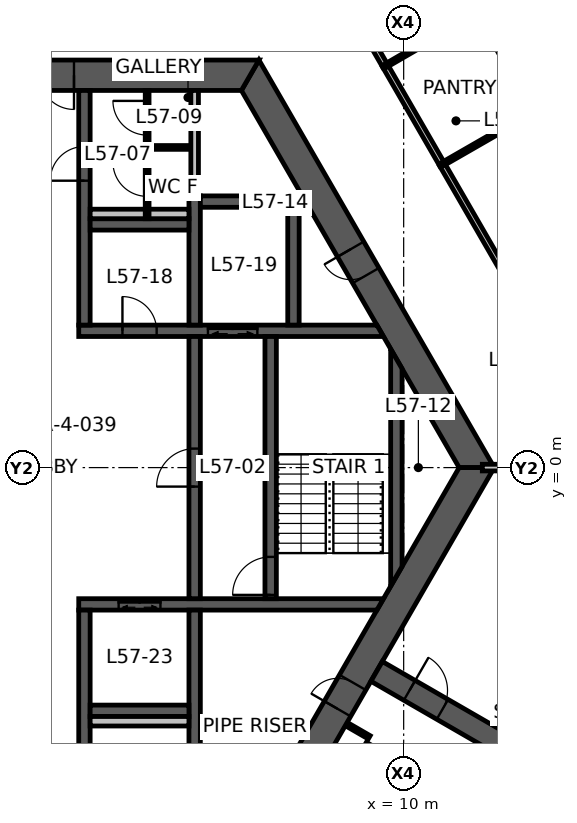
"""IFC4 building model, lengths in metres.
Left out: names, types, materials, properties, quantities, classifications, styles, units other than length and angle.
Written with IfcOpenShell. Run it as: python <this file> out.ifc"""

import sys

from ifc_helpers import new_model, si_unit, direction, frame, frame_2d, origin, place, context, subcontext, project, spatial, polyline, rectangle, outline, extrude, element, fill, save


model = new_model("IFC4")
c1 = context("Model", 3, precision=1e-05, world=origin(), true_north=direction((0.0, 1.0)))
c2 = subcontext(c1, "Body", "Model", "MODEL_VIEW")
j1 = project(units=[si_unit("LENGTHUNIT", "METRE"), si_unit("PLANEANGLEUNIT", "RADIAN")], contexts=[c1])
p1 = place(None, origin())
s1 = spatial("IfcSite", under=j1, at=p1, CompositionType="ELEMENT")
p2 = place(p1, origin())
s2 = spatial("IfcBuilding", under=s1, at=p2, CompositionType="ELEMENT")
p3 = place(p2, frame((0.0, 0.0, 228.4)))
s3 = spatial("IfcBuildingStorey", under=s2, at=p3, CompositionType="ELEMENT", Elevation=228.4)
p4 = place(p3, frame((11.922, 0.0, 0.0), z_axis=(0.0, 0.0, 1.0), x_axis=(-0.500004296715, 0.866022923061, 0.0)))
e1 = element("IfcWall", 1, at=p4, inside=s3, PredefinedType="SHEAR", context=c2, shape_type="SweptSolid", body=[
    extrude(outline(polyline([(-0.231, -0.4), (5.835, -0.4), (6.635, -0.4), (12.153, -0.4), (11.691, 0.4), (6.635, 0.4), (5.835, 0.4), (0.231, 0.4), (-0.231, -0.4)])), origin(), (0.0, 0.0, 1.0), 3.9),
])
p5 = place(p4, frame((5.835, 0.0, 0.0)))
e2 = element("IfcOpeningElement", 2, at=p5, cuts=e1, PredefinedType="OPENING", context=c2, shape_type="SweptSolid", body=[
    extrude(rectangle(XDim=0.8, YDim=2.1, at=frame_2d((0.4, 1.05))), frame((0.0, 0.41, 0.0), z_axis=(0.0, -1.0, 0.0), x_axis=(1.0, 0.0, 0.0)), (0.0, 0.0, 1.0), 0.82),
])
p6 = place(p3, frame((5.961, 10.325, 0.0), z_axis=(0.0, 0.0, 1.0), x_axis=(-1.0, 0.0, 0.0)))
e3 = element("IfcWall", 3, at=p6, inside=s3, PredefinedType="SHEAR", context=c2, shape_type="SweptSolid", body=[
    extrude(outline(polyline([(-0.231, -0.4), (4.636, -0.4), (5.536, -0.4), (6.386, -0.4), (7.286, -0.4), (12.153, -0.4), (11.691, 0.4), (7.286, 0.4), (6.386, 0.4), (5.536, 0.4), (4.636, 0.4), (0.231, 0.4), (-0.231, -0.4)])), origin(), (0.0, 0.0, 1.0), 3.9),
])
p7 = place(p6, frame((6.386, 0.0, 0.0)))
e4 = element("IfcOpeningElement", 4, at=p7, cuts=e3, PredefinedType="OPENING", context=c2, shape_type="SweptSolid", body=[
    extrude(rectangle(XDim=0.9, YDim=2.1, at=frame_2d((0.45, 1.05))), frame((0.0, 0.41, 0.0), z_axis=(0.0, -1.0, 0.0), x_axis=(1.0, 0.0, 0.0)), (0.0, 0.0, 1.0), 0.82),
])
p8 = place(p6, frame((4.636, 0.0, 0.0)))
e5 = element("IfcOpeningElement", 5, at=p8, cuts=e3, PredefinedType="OPENING", context=c2, shape_type="SweptSolid", body=[
    extrude(rectangle(XDim=0.9, YDim=2.1, at=frame_2d((0.45, 1.05))), frame((0.0, 0.41, 0.0), z_axis=(0.0, -1.0, 0.0), x_axis=(1.0, 0.0, 0.0)), (0.0, 0.0, 1.0), 0.82),
])
p9 = place(p3, frame((5.961, -10.325, 0.0), z_axis=(0.0, 0.0, 1.0), x_axis=(0.500004296715, 0.866022923061, 0.0)))
e6 = element("IfcWall", 6, at=p9, inside=s3, PredefinedType="SHEAR", context=c2, shape_type="SweptSolid", body=[
    extrude(outline(polyline([(-0.231, -0.4), (4.594, -0.4), (5.394, -0.4), (12.153, -0.4), (11.691, 0.4), (5.394, 0.4), (4.594, 0.4), (0.231, 0.4), (-0.231, -0.4)])), origin(), (0.0, 0.0, 1.0), 3.9),
])
p10 = place(p9, frame((4.594, 0.0, 0.0)))
e7 = element("IfcOpeningElement", 7, at=p10, cuts=e6, PredefinedType="OPENING", context=c2, shape_type="SweptSolid", body=[
    extrude(rectangle(XDim=0.8, YDim=2.1, at=frame_2d((0.4, 1.05))), frame((0.0, 0.41, 0.0), z_axis=(0.0, -1.0, 0.0), x_axis=(1.0, 0.0, 0.0)), (0.0, 0.0, 1.0), 0.82),
])
p11 = place(p3, frame((9.288, -5.363, 0.0), z_axis=(0.0, 0.0, 1.0), x_axis=(0.866031736626, -0.499989031036, 0.0)))
e8 = element("IfcWall", 8, at=p11, inside=s3, PredefinedType="SHEAR", context=c2, shape_type="SweptSolid", body=[
    extrude(rectangle(XDim=7.796, YDim=0.6, at=frame_2d((3.898, 0.0))), origin(), (0.0, 0.0, 1.0), 3.9),
])
p12 = place(p11, frame((1.0, 0.0, 0.0)))
e9 = element("IfcOpeningElement", 9, at=p12, cuts=e8, PredefinedType="OPENING", context=c2, shape_type="SweptSolid", body=[
    extrude(rectangle(XDim=1.0, YDim=2.1, at=frame_2d((0.5, 1.05))), frame((0.0, 0.31, 0.0), z_axis=(0.0, -1.0, 0.0), x_axis=(1.0, 0.0, 0.0)), (0.0, 0.0, 1.0), 0.62),
])
p13 = place(p3, frame((1.45, 3.6, 0.0), z_axis=(0.0, 0.0, 1.0), x_axis=(1.0, 0.0, 0.0)))
e10 = element("IfcWall", 10, at=p13, inside=s3, PredefinedType="SHEAR", context=c2, shape_type="SweptSolid", body=[
    extrude(outline(polyline([(0.0, -0.15), (1.15, -0.15), (2.05, -0.15), (3.4, -0.15), (4.7, -0.15), (8.019, -0.15), (7.845, 0.15), (4.7, 0.15), (3.4, 0.15), (2.05, 0.15), (1.15, 0.15), (0.0, 0.15), (0.0, -0.15)])), origin(), (0.0, 0.0, 1.0), 3.9),
])
p14 = place(p13, frame((1.15, 0.0, 0.0)))
e11 = element("IfcOpeningElement", 11, at=p14, cuts=e10, PredefinedType="OPENING", context=c2, shape_type="SweptSolid", body=[
    extrude(rectangle(XDim=0.9, YDim=2.1, at=frame_2d((0.45, 1.05))), frame((0.0, 0.16, 0.0), z_axis=(0.0, -1.0, 0.0), x_axis=(1.0, 0.0, 0.0)), (0.0, 0.0, 1.0), 0.32),
])
p15 = place(p13, frame((3.4, 0.0, 0.0)))
e12 = element("IfcOpeningElement", 12, at=p15, cuts=e10, PredefinedType="OPENING", context=c2, shape_type="SweptSolid", body=[
    extrude(rectangle(XDim=1.3, YDim=2.1, at=frame_2d((0.65, 1.05))), frame((0.0, 0.16, 0.0), z_axis=(0.0, -1.0, 0.0), x_axis=(1.0, 0.0, 0.0)), (0.0, 0.0, 1.0), 0.32),
])
p16 = place(p3, frame((1.45, -3.6, 0.0), z_axis=(0.0, 0.0, 1.0), x_axis=(1.0, 0.0, 0.0)))
e13 = element("IfcWall", 13, at=p16, inside=s3, PredefinedType="SHEAR", context=c2, shape_type="SweptSolid", body=[
    extrude(outline(polyline([(0.0, -0.15), (1.05, -0.15), (2.15, -0.15), (7.845, -0.15), (8.019, 0.15), (2.15, 0.15), (1.05, 0.15), (0.0, 0.15), (0.0, -0.15)])), origin(), (0.0, 0.0, 1.0), 3.9),
])
p17 = place(p16, frame((1.05, 0.0, 0.0)))
e14 = element("IfcOpeningElement", 14, at=p17, cuts=e13, PredefinedType="OPENING", context=c2, shape_type="SweptSolid", body=[
    extrude(rectangle(XDim=1.1, YDim=2.1, at=frame_2d((0.55, 1.05))), frame((0.0, 0.16, 0.0), z_axis=(0.0, -1.0, 0.0), x_axis=(1.0, 0.0, 0.0)), (0.0, 0.0, 1.0), 0.32),
])
p18 = place(p3, frame((1.6, 3.75, 0.0), z_axis=(0.0, 0.0, 1.0), x_axis=(0.0, 1.0, 0.0)))
e15 = element("IfcWall", 15, at=p18, inside=s3, PredefinedType="SHEAR", context=c2, shape_type="SweptSolid", body=[
    extrude(rectangle(XDim=6.175, YDim=0.3, at=frame_2d((3.087, 0.0))), origin(), (0.0, 0.0, 1.0), 3.9),
])
p19 = place(p18, frame((3.8, 0.0, 0.0)))
e16 = element("IfcOpeningElement", 16, at=p19, cuts=e15, PredefinedType="OPENING", context=c2, shape_type="SweptSolid", body=[
    extrude(rectangle(XDim=0.9, YDim=2.1, at=frame_2d((0.45, 1.05))), frame((0.0, 0.16, 0.0), z_axis=(0.0, -1.0, 0.0), x_axis=(1.0, 0.0, 0.0)), (0.0, 0.0, 1.0), 0.32),
])
p20 = place(p3, frame((1.6, -3.75, 0.0), z_axis=(0.0, 0.0, 1.0), x_axis=(0.0, -1.0, 0.0)))
e17 = element("IfcWall", 17, at=p20, inside=s3, PredefinedType="SHEAR", context=c2, shape_type="SweptSolid", body=[
    extrude(rectangle(XDim=6.175, YDim=0.3, at=frame_2d((3.087, 0.0))), origin(), (0.0, 0.0, 1.0), 3.9),
])
p21 = place(p20, frame((3.65, 0.0, 0.0)))
e18 = element("IfcOpeningElement", 18, at=p21, cuts=e17, PredefinedType="OPENING", context=c2, shape_type="SweptSolid", body=[
    extrude(rectangle(XDim=1.2, YDim=2.1, at=frame_2d((0.6, 1.05))), frame((0.0, 0.16, 0.0), z_axis=(0.0, -1.0, 0.0), x_axis=(1.0, 0.0, 0.0)), (0.0, 0.0, 1.0), 0.32),
])
p22 = place(p3, frame((4.5, -3.45, 0.0), z_axis=(0.0, 0.0, 1.0), x_axis=(0.0, 1.0, 0.0)))
e19 = element("IfcWall", 19, at=p22, inside=s3, PredefinedType="SHEAR", context=c2, shape_type="SweptSolid", body=[
    extrude(rectangle(XDim=6.9, YDim=0.3, at=frame_2d((3.45, 0.0))), origin(), (0.0, 0.0, 1.0), 3.9),
])
p23 = place(p22, frame((2.95, 0.0, 0.0)))
e20 = element("IfcOpeningElement", 20, at=p23, cuts=e19, PredefinedType="OPENING", context=c2, shape_type="SweptSolid", body=[
    extrude(rectangle(XDim=1.0, YDim=2.1, at=frame_2d((0.5, 1.05))), frame((0.0, 0.16, 0.0), z_axis=(0.0, -1.0, 0.0), x_axis=(1.0, 0.0, 0.0)), (0.0, 0.0, 1.0), 0.32),
])
p24 = place(p3, frame((6.5, -3.45, 0.0), z_axis=(0.0, 0.0, 1.0), x_axis=(0.0, 1.0, 0.0)))
e21 = element("IfcWall", 21, at=p24, inside=s3, PredefinedType="SHEAR", context=c2, shape_type="SweptSolid", body=[
    extrude(rectangle(XDim=6.9, YDim=0.3, at=frame_2d((3.45, 0.0))), origin(), (0.0, 0.0, 1.0), 3.9),
])
p25 = place(p24, frame((0.1, 0.0, 0.0)))
e22 = element("IfcOpeningElement", 22, at=p25, cuts=e21, PredefinedType="OPENING", context=c2, shape_type="SweptSolid", body=[
    extrude(rectangle(XDim=1.0, YDim=2.1, at=frame_2d((0.5, 1.05))), frame((0.0, 0.16, 0.0), z_axis=(0.0, -1.0, 0.0), x_axis=(1.0, 0.0, 0.0)), (0.0, 0.0, 1.0), 0.32),
])
p26 = place(p3, frame((4.5, 3.75, 0.0), z_axis=(0.0, 0.0, 1.0), x_axis=(0.0, 1.0, 0.0)))
e23 = element("IfcWall", 23, at=p26, inside=s3, PredefinedType="SHEAR", context=c2, shape_type="SweptSolid", body=[
    extrude(rectangle(XDim=3.4, YDim=0.3, at=frame_2d((1.7, 0.0))), origin(), (0.0, 0.0, 1.0), 3.9),
])
p27 = place(p3, frame((4.5, -3.75, 0.0), z_axis=(0.0, 0.0, 1.0), x_axis=(0.0, -1.0, 0.0)))
e24 = element("IfcWall", 24, at=p27, inside=s3, PredefinedType="SHEAR", context=c2, shape_type="SweptSolid", body=[
    extrude(rectangle(XDim=6.175, YDim=0.3, at=frame_2d((3.087, 0.0))), origin(), (0.0, 0.0, 1.0), 3.9),
])
for number, where, z_axis, x_axis in (
    (25, (1.75, 6.4, 0.0), (0.0, 0.0, 1.0), (1.0, 0.0, 0.0)),
    (26, (1.75, -6.4, 0.0), (0.0, 0.0, 1.0), (1.0, 0.0, 0.0)),
    (27, (4.65, 7.0, 0.0), (0.0, 0.0, 1.0), (1.0, 0.0, 0.0)),
):
    element("IfcWall", number, at=place(p3, frame(where, z_axis=z_axis, x_axis=x_axis)), inside=s3, PredefinedType="SHEAR", context=c2, shape_type="SweptSolid", body=[
        extrude(rectangle(XDim=2.6, YDim=0.3, at=frame_2d((1.3, 0.0))), origin(), (0.0, 0.0, 1.0), 3.9),
    ])
p28 = place(p3, frame((7.1, 3.75, 0.0), z_axis=(0.0, 0.0, 1.0), x_axis=(0.0, 1.0, 0.0)))
e28 = element("IfcWall", 28, at=p28, inside=s3, PredefinedType="SHEAR", context=c2, shape_type="SweptSolid", body=[
    extrude(rectangle(XDim=3.1, YDim=0.3, at=frame_2d((1.55, 0.0))), origin(), (0.0, 0.0, 1.0), 3.9),
])
p29 = place(p3, frame((9.808, -2.862, 0.0), z_axis=(0.0, 0.0, 1.0), x_axis=(0.0, 1.0, 0.0)))
e29 = element("IfcWall", 29, at=p29, inside=s3, PredefinedType="SHEAR", context=c2, shape_type="SweptSolid", body=[
    extrude(outline(polyline([(0.26, -0.15), (5.465, -0.15), (5.984, 0.15), (-0.26, 0.15), (0.26, -0.15)])), origin(), (0.0, 0.0, 1.0), 3.9),
])
p30 = place(p3, frame((4.5, 7.15, 0.0), z_axis=(0.0, 0.0, 1.0), x_axis=(0.0, 1.0, 0.0)))
e30 = element("IfcWall", 30, at=p30, inside=s3, PredefinedType="STANDARD", context=c2, shape_type="SweptSolid", body=[
    extrude(rectangle(XDim=2.775, YDim=0.2, at=frame_2d((1.388, 0.0))), origin(), (0.0, 0.0, 1.0), 3.9),
])
for number, where, z_axis, x_axis in (
    (31, (1.75, 6.675, 0.0), (0.0, 0.0, 1.0), (1.0, 0.0, 0.0)),
    (32, (1.75, -6.675, 0.0), (0.0, 0.0, 1.0), (1.0, 0.0, 0.0)),
):
    element("IfcWall", number, at=place(p3, frame(where, z_axis=z_axis, x_axis=x_axis)), inside=s3, PredefinedType="PLUMBINGWALL", context=c2, shape_type="SweptSolid", body=[
        extrude(rectangle(XDim=2.6, YDim=0.25, at=frame_2d((1.3, 0.0))), origin(), (0.0, 0.0, 1.0), 3.9),
    ])
p31 = place(p3, frame((3.25, 6.55, 0.0), z_axis=(0.0, 0.0, 1.0), x_axis=(0.0, 1.0, 0.0)))
e33 = element("IfcWall", 33, at=p31, inside=s3, PredefinedType="PARTITIONING", context=c2, shape_type="SweptSolid", body=[
    extrude(rectangle(XDim=3.375, YDim=0.1, at=frame_2d((1.688, 0.0))), origin(), (0.0, 0.0, 1.0), 2.95),
])
p32 = place(p31, frame((0.587, 0.0, 0.0)))
e34 = element("IfcOpeningElement", 34, at=p32, cuts=e33, PredefinedType="OPENING", context=c2, shape_type="SweptSolid", body=[
    extrude(rectangle(XDim=0.9, YDim=2.1, at=frame_2d((0.45, 1.05))), frame((0.0, 0.06, 0.0), z_axis=(0.0, -1.0, 0.0), x_axis=(1.0, 0.0, 0.0)), (0.0, 0.0, 1.0), 0.12),
])
p33 = place(p31, frame((2.2, 0.0, 0.0)))
e35 = element("IfcOpeningElement", 35, at=p33, cuts=e33, PredefinedType="OPENING", context=c2, shape_type="SweptSolid", body=[
    extrude(rectangle(XDim=0.9, YDim=2.1, at=frame_2d((0.45, 1.05))), frame((0.0, 0.06, 0.0), z_axis=(0.0, -1.0, 0.0), x_axis=(1.0, 0.0, 0.0)), (0.0, 0.0, 1.0), 0.12),
])
p34 = place(p3, frame((3.3, 8.425, 0.0), z_axis=(0.0, 0.0, 1.0), x_axis=(1.0, 0.0, 0.0)))
e36 = element("IfcWall", 36, at=p34, inside=s3, PredefinedType="PARTITIONING", context=c2, shape_type="SweptSolid", body=[
    extrude(rectangle(XDim=1.05, YDim=0.1, at=frame_2d((0.525, 0.0))), origin(), (0.0, 0.0, 1.0), 2.95),
])
p35 = place(p3, frame((12.07, 0.0, 0.0), z_axis=(0.0, 0.0, 1.0), x_axis=(1.0, 0.0, 0.0)))
e37 = element("IfcWall", 37, at=p35, inside=s3, PredefinedType="PARTITIONING", context=c2, shape_type="SweptSolid", body=[
    extrude(rectangle(XDim=7.93, YDim=0.175, at=frame_2d((3.965, 0.0))), origin(), (0.0, 0.0, 1.0), 3.05),
])
p36 = place(p35, frame((1.13, 0.0, 0.0)))
e38 = element("IfcOpeningElement", 38, at=p36, cuts=e37, PredefinedType="OPENING", context=c2, shape_type="SweptSolid", body=[
    extrude(rectangle(XDim=1.0, YDim=2.1, at=frame_2d((0.5, 1.05))), frame((0.0, 0.098, 0.0), z_axis=(0.0, -1.0, 0.0), x_axis=(1.0, 0.0, 0.0)), (0.0, 0.0, 1.0), 0.195),
])
p37 = place(p3, frame((9.51, 10.577, 0.0), z_axis=(0.0, 0.0, 1.0), x_axis=(0.499977562641, -0.866038357612, 0.0)))
e39 = element("IfcWall", 39, at=p37, inside=s3, PredefinedType="PARTITIONING", context=c2, shape_type="SweptSolid", body=[
    extrude(rectangle(XDim=3.01, YDim=0.15, at=frame_2d((1.505, 0.0))), origin(), (0.0, 0.0, 1.0), 2.95),
])
p38 = place(p3, frame((7.809, 13.525, 0.0), z_axis=(0.0, 0.0, 1.0), x_axis=(0.500001088571, -0.866024775297, 0.0)))
e40 = element("IfcWall", 40, at=p38, inside=s3, PredefinedType="PARTITIONING", context=c2, shape_type="SweptSolid", body=[
    extrude(rectangle(XDim=3.413, YDim=0.15, at=frame_2d((1.707, 0.0))), origin(), (0.0, 0.0, 1.0), 2.95),
])
p39 = place(p3, frame((11.011, 7.979, 0.0), z_axis=(0.0, 0.0, 1.0), x_axis=(0.49999917462, -0.866025880317, 0.0)))
e41 = element("IfcWall", 41, at=p39, inside=s3, PredefinedType="PARTITIONING", context=c2, shape_type="SweptSolid", body=[
    extrude(rectangle(XDim=9.19, YDim=0.15, at=frame_2d((4.595, 0.0))), origin(), (0.0, 0.0, 1.0), 2.95),
])
p40 = place(p39, frame((4.095, 0.0, 0.0)))
e42 = element("IfcOpeningElement", 42, at=p40, cuts=e41, PredefinedType="OPENING", context=c2, shape_type="SweptSolid", body=[
    extrude(rectangle(XDim=1.0, YDim=2.1, at=frame_2d((0.5, 1.05))), frame((0.0, 0.085, 0.0), z_axis=(0.0, -1.0, 0.0), x_axis=(1.0, 0.0, 0.0)), (0.0, 0.0, 1.0), 0.17),
])
p41 = place(p3, frame((9.515, 10.569, 0.0), z_axis=(0.0, 0.0, 1.0), x_axis=(0.865255114713, 0.501331812737, 0.0)))
e43 = element("IfcWall", 43, at=p41, inside=s3, PredefinedType="PARTITIONING", context=c2, shape_type="SweptSolid", body=[
    extrude(rectangle(XDim=2.8, YDim=0.1, at=frame_2d((1.4, 0.0))), origin(), (0.0, 0.0, 1.0), 2.95),
])
p42 = place(p3, frame((11.938, 11.973, 0.0), z_axis=(0.0, 0.0, 1.0), x_axis=(0.50002537861, -0.866010750942, 0.0)))
e44 = element("IfcWall", 44, at=p42, inside=s3, PredefinedType="PARTITIONING", context=c2, shape_type="SweptSolid", body=[
    extrude(rectangle(XDim=3.0, YDim=0.1, at=frame_2d((1.5, 0.0))), origin(), (0.0, 0.0, 1.0), 2.95),
])
p43 = place(p42, frame((1.8, 0.0, 0.0)))
e45 = element("IfcOpeningElement", 45, at=p43, cuts=e44, PredefinedType="OPENING", context=c2, shape_type="SweptSolid", body=[
    extrude(rectangle(XDim=0.9, YDim=2.1, at=frame_2d((0.45, 1.05))), frame((0.0, 0.06, 0.0), z_axis=(0.0, -1.0, 0.0), x_axis=(1.0, 0.0, 0.0)), (0.0, 0.0, 1.0), 0.12),
])
p44 = place(p3, frame((13.438, 9.375, 0.0), z_axis=(0.0, 0.0, 1.0), x_axis=(-0.866817750494, -0.498625097071, 0.0)))
e46 = element("IfcWall", 46, at=p44, inside=s3, PredefinedType="PARTITIONING", context=c2, shape_type="SweptSolid", body=[
    extrude(rectangle(XDim=2.8, YDim=0.1, at=frame_2d((1.4, 0.0))), origin(), (0.0, 0.0, 1.0), 2.95),
])
p45 = place(p3, frame((8.505, -6.758, 0.0), z_axis=(0.0, 0.0, 1.0), x_axis=(0.865958369053, -0.50011608959, 0.0)))
e47 = element("IfcWall", 47, at=p45, inside=s3, PredefinedType="PARTITIONING", context=c2, shape_type="SweptSolid", body=[
    extrude(rectangle(XDim=0.68, YDim=0.1, at=frame_2d((0.34, 0.0))), origin(), (0.0, 0.0, 1.0), 2.95),
])
p46 = place(p3, frame((8.994, -7.271, 0.0), z_axis=(0.0, 0.0, 1.0), x_axis=(0.865989903783, -0.500061482766, 0.0)))
e48 = element("IfcWall", 48, at=p46, inside=s3, PredefinedType="PARTITIONING", context=c2, shape_type="SweptSolid", body=[
    extrude(rectangle(XDim=1.6, YDim=0.1, at=frame_2d((0.8, 0.0))), origin(), (0.0, 0.0, 1.0), 2.95),
])
p47 = place(p8, origin())
e49 = element("IfcDoor", 49, at=p47, inside=s3, OperationType="SINGLE_SWING_LEFT", PredefinedType="DOOR", context=c2, shape_type="SweptSolid", body=[
    extrude(rectangle(XDim=0.9, YDim=2.1, at=frame_2d((0.45, 1.05))), frame((0.0, 0.025, 0.0), z_axis=(0.0, -1.0, 0.0), x_axis=(1.0, 0.0, 0.0)), (0.0, 0.0, 1.0), 0.05),
])
fill(e5, e49)
p48 = place(p5, origin())
e50 = element("IfcDoor", 50, at=p48, inside=s3, OperationType="SINGLE_SWING_RIGHT", PredefinedType="DOOR", context=c2, shape_type="SweptSolid", body=[
    extrude(rectangle(XDim=0.8, YDim=2.1, at=frame_2d((0.4, 1.05))), frame((0.0, 0.025, 0.0), z_axis=(0.0, -1.0, 0.0), x_axis=(1.0, 0.0, 0.0)), (0.0, 0.0, 1.0), 0.05),
])
fill(e2, e50)
p49 = place(p10, origin())
e51 = element("IfcDoor", 51, at=p49, inside=s3, OperationType="SINGLE_SWING_LEFT", PredefinedType="DOOR", context=c2, shape_type="SweptSolid", body=[
    extrude(rectangle(XDim=0.8, YDim=2.1, at=frame_2d((0.4, 1.05))), frame((0.0, 0.025, 0.0), z_axis=(0.0, -1.0, 0.0), x_axis=(1.0, 0.0, 0.0)), (0.0, 0.0, 1.0), 0.05),
])
fill(e7, e51)
p50 = place(p23, origin())
e52 = element("IfcDoor", 52, at=p50, inside=s3, OperationType="SINGLE_SWING_LEFT", PredefinedType="DOOR", context=c2, shape_type="SweptSolid", body=[
    extrude(rectangle(XDim=1.0, YDim=2.1, at=frame_2d((0.5, 1.05))), frame((0.0, 0.025, 0.0), z_axis=(0.0, -1.0, 0.0), x_axis=(1.0, 0.0, 0.0)), (0.0, 0.0, 1.0), 0.05),
])
fill(e20, e52)
p51 = place(p25, origin())
e53 = element("IfcDoor", 53, at=p51, inside=s3, OperationType="SINGLE_SWING_LEFT", PredefinedType="DOOR", context=c2, shape_type="SweptSolid", body=[
    extrude(rectangle(XDim=1.0, YDim=2.1, at=frame_2d((0.5, 1.05))), frame((0.0, 0.025, 0.0), z_axis=(0.0, -1.0, 0.0), x_axis=(1.0, 0.0, 0.0)), (0.0, 0.0, 1.0), 0.05),
])
fill(e22, e53)
p52 = place(p19, origin())
e54 = element("IfcDoor", 54, at=p52, inside=s3, OperationType="SINGLE_SWING_LEFT", PredefinedType="DOOR", context=c2, shape_type="SweptSolid", body=[
    extrude(rectangle(XDim=0.9, YDim=2.1, at=frame_2d((0.45, 1.05))), frame((0.0, 0.025, 0.0), z_axis=(0.0, -1.0, 0.0), x_axis=(1.0, 0.0, 0.0)), (0.0, 0.0, 1.0), 0.05),
])
fill(e16, e54)
p53 = place(p14, origin())
e55 = element("IfcDoor", 55, at=p53, inside=s3, OperationType="SINGLE_SWING_LEFT", PredefinedType="DOOR", context=c2, shape_type="SweptSolid", body=[
    extrude(rectangle(XDim=0.9, YDim=2.1, at=frame_2d((0.45, 1.05))), frame((0.0, 0.025, 0.0), z_axis=(0.0, -1.0, 0.0), x_axis=(1.0, 0.0, 0.0)), (0.0, 0.0, 1.0), 0.05),
])
fill(e11, e55)
p54 = place(p12, origin())
e56 = element("IfcDoor", 56, at=p54, inside=s3, OperationType="SINGLE_SWING_LEFT", PredefinedType="DOOR", context=c2, shape_type="SweptSolid", body=[
    extrude(rectangle(XDim=1.0, YDim=2.1, at=frame_2d((0.5, 1.05))), frame((0.0, 0.025, 0.0), z_axis=(0.0, -1.0, 0.0), x_axis=(1.0, 0.0, 0.0)), (0.0, 0.0, 1.0), 0.05),
])
fill(e9, e56)
p55 = place(p32, origin())
e57 = element("IfcDoor", 57, at=p55, inside=s3, OperationType="SINGLE_SWING_RIGHT", PredefinedType="DOOR", context=c2, shape_type="SweptSolid", body=[
    extrude(rectangle(XDim=0.9, YDim=2.1, at=frame_2d((0.45, 1.05))), frame((0.0, 0.025, 0.0), z_axis=(0.0, -1.0, 0.0), x_axis=(1.0, 0.0, 0.0)), (0.0, 0.0, 1.0), 0.05),
])
fill(e34, e57)
p56 = place(p33, origin())
e58 = element("IfcDoor", 58, at=p56, inside=s3, OperationType="SINGLE_SWING_RIGHT", PredefinedType="DOOR", context=c2, shape_type="SweptSolid", body=[
    extrude(rectangle(XDim=0.9, YDim=2.1, at=frame_2d((0.45, 1.05))), frame((0.0, 0.025, 0.0), z_axis=(0.0, -1.0, 0.0), x_axis=(1.0, 0.0, 0.0)), (0.0, 0.0, 1.0), 0.05),
])
fill(e35, e58)
p57 = place(p17, origin())
e59 = element("IfcDoor", 59, at=p57, inside=s3, OperationType="DOUBLE_DOOR_SLIDING", PredefinedType="DOOR", context=c2, shape_type="SweptSolid", body=[
    extrude(rectangle(XDim=1.1, YDim=2.1, at=frame_2d((0.55, 1.05))), frame((0.0, 0.025, 0.0), z_axis=(0.0, -1.0, 0.0), x_axis=(1.0, 0.0, 0.0)), (0.0, 0.0, 1.0), 0.05),
])
fill(e14, e59)
p58 = place(p15, origin())
e60 = element("IfcDoor", 60, at=p58, inside=s3, OperationType="DOUBLE_DOOR_SLIDING", PredefinedType="DOOR", context=c2, shape_type="SweptSolid", body=[
    extrude(rectangle(XDim=1.3, YDim=2.1, at=frame_2d((0.65, 1.05))), frame((0.0, 0.025, 0.0), z_axis=(0.0, -1.0, 0.0), x_axis=(1.0, 0.0, 0.0)), (0.0, 0.0, 1.0), 0.05),
])
fill(e12, e60)
save(model, sys.argv[1])
